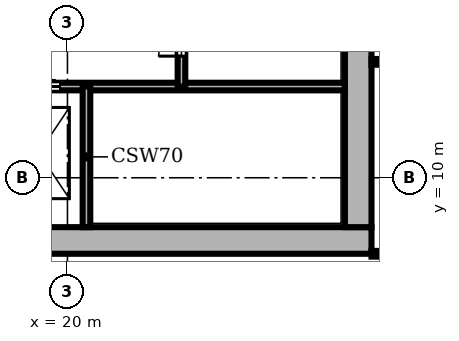
"""IFC4 building model, lengths in metres.
Left out: names, types, materials, properties, quantities, classifications, styles, units other than length and angle.
Written with IfcOpenShell. Run it as: python <this file> out.ifc"""

import sys

from ifc_helpers import new_model, si_unit, direction, frame, frame_2d, origin, place, context, subcontext, project, spatial, rectangle, extrude, element, fill, save


model = new_model("IFC4")
c1 = context("Model", 3, precision=1e-05, world=origin(), true_north=direction((0.0, 1.0)))
c2 = subcontext(c1, "Body", "Model", "MODEL_VIEW")
j1 = project(units=[si_unit("LENGTHUNIT", "METRE"), si_unit("PLANEANGLEUNIT", "RADIAN")], contexts=[c1])
p1 = place(None, origin())
s1 = spatial("IfcSite", under=j1, at=p1, CompositionType="ELEMENT")
p2 = place(p1, origin())
s2 = spatial("IfcBuilding", under=s1, at=p2, CompositionType="ELEMENT")
p3 = place(p2, frame((0.0, 0.0, 205.8)))
s3 = spatial("IfcBuildingStorey", under=s2, at=p3, CompositionType="ELEMENT", Elevation=205.8)
p4 = place(p3, frame((8.0, 8.35, 0.0), z_axis=(0.0, 0.0, 1.0), x_axis=(1.0, 0.0, 0.0)))
e1 = element("IfcWall", 1, at=p4, inside=s3, PredefinedType="SHEAR", context=c2, shape_type="SweptSolid", body=[
    extrude(rectangle(XDim=20.0, YDim=0.7, at=frame_2d((10.0, 0.0))), origin(), (0.0, 0.0, 1.0), 3.9),
])
p5 = place(p3, frame((27.65, 8.7, 0.0), z_axis=(0.0, 0.0, 1.0), x_axis=(0.0, 1.0, 0.0)))
e2 = element("IfcWall", 2, at=p5, inside=s3, PredefinedType="SHEAR", context=c2, shape_type="SweptSolid", body=[
    extrude(rectangle(XDim=18.6, YDim=0.7, at=frame_2d((9.3, 0.0))), origin(), (0.0, 0.0, 1.0), 3.9),
])
p6 = place(p5, frame((4.75, 0.0, 0.0)))
e3 = element("IfcOpeningElement", 3, at=p6, cuts=e2, PredefinedType="OPENING", context=c2, shape_type="SweptSolid", body=[
    extrude(rectangle(XDim=1.6, YDim=2.1, at=frame_2d((0.8, 1.05))), frame((0.0, 0.36, 0.0), z_axis=(0.0, -1.0, 0.0), x_axis=(1.0, 0.0, 0.0)), (0.0, 0.0, 1.0), 0.72),
])
p7 = place(p3, frame((13.8, 12.4, 0.0), z_axis=(0.0, 0.0, 1.0), x_axis=(1.0, 0.0, 0.0)))
e4 = element("IfcWall", 4, at=p7, inside=s3, PredefinedType="SHEAR", context=c2, shape_type="SweptSolid", body=[
    extrude(rectangle(XDim=13.5, YDim=0.2, at=frame_2d((6.75, 0.0))), origin(), (0.0, 0.0, 1.0), 3.58),
])
p8 = place(p7, frame((2.4, 0.0, 0.0)))
e5 = element("IfcOpeningElement", 5, at=p8, cuts=e4, PredefinedType="OPENING", context=c2, shape_type="SweptSolid", body=[
    extrude(rectangle(XDim=1.1, YDim=2.1, at=frame_2d((0.55, 1.05))), frame((0.0, 0.11, 0.0), z_axis=(0.0, -1.0, 0.0), x_axis=(1.0, 0.0, 0.0)), (0.0, 0.0, 1.0), 0.22),
])
p9 = place(p7, frame((4.9, 0.0, 0.0)))
e6 = element("IfcOpeningElement", 6, at=p9, cuts=e4, PredefinedType="OPENING", context=c2, shape_type="SweptSolid", body=[
    extrude(rectangle(XDim=1.1, YDim=2.1, at=frame_2d((0.55, 1.05))), frame((0.0, 0.11, 0.0), z_axis=(0.0, -1.0, 0.0), x_axis=(1.0, 0.0, 0.0)), (0.0, 0.0, 1.0), 0.22),
])
p10 = place(p7, frame((0.2, 0.0, 0.0)))
e7 = element("IfcOpeningElement", 7, at=p10, cuts=e4, PredefinedType="OPENING", context=c2, shape_type="SweptSolid", body=[
    extrude(rectangle(XDim=1.0, YDim=2.1, at=frame_2d((0.5, 1.05))), frame((0.0, 0.11, 0.0), z_axis=(0.0, -1.0, 0.0), x_axis=(1.0, 0.0, 0.0)), (0.0, 0.0, 1.0), 0.22),
])
p11 = place(p3, frame((20.5, 8.7, 0.0), z_axis=(0.0, 0.0, 1.0), x_axis=(0.0, 1.0, 0.0)))
e8 = element("IfcWall", 8, at=p11, inside=s3, PredefinedType="SHEAR", context=c2, shape_type="SweptSolid", body=[
    extrude(rectangle(XDim=3.7, YDim=0.2, at=frame_2d((1.85, 0.0))), origin(), (0.0, 0.0, 1.0), 3.58),
])
p12 = place(p3, frame((23.0, 12.4, 0.0), z_axis=(0.0, 0.0, 1.0), x_axis=(0.0, 1.0, 0.0)))
e9 = element("IfcWall", 9, at=p12, inside=s3, PredefinedType="SHEAR", context=c2, shape_type="SweptSolid", body=[
    extrude(rectangle(XDim=2.8, YDim=0.2, at=frame_2d((1.4, 0.0))), origin(), (0.0, 0.0, 1.0), 3.58),
])
p13 = place(p12, frame((0.8, 0.0, 0.0)))
e10 = element("IfcOpeningElement", 10, at=p13, cuts=e9, PredefinedType="OPENING", context=c2, shape_type="SweptSolid", body=[
    extrude(rectangle(XDim=1.2, YDim=2.1, at=frame_2d((0.6, 1.05))), frame((0.0, 0.11, 0.0), z_axis=(0.0, -1.0, 0.0), x_axis=(1.0, 0.0, 0.0)), (0.0, 0.0, 1.0), 0.22),
])
for number, where, z_axis, x_axis in (
    (11, (28.0, 8.0, 0.0), (0.0, 0.0, 1.0), (1.0, 0.0, 0.0)),
    (12, (28.0, 13.05, 0.0), (0.0, 0.0, 1.0), (1.0, 0.0, 0.0)),
):
    element("IfcWall", number, at=place(p3, frame(where, z_axis=z_axis, x_axis=x_axis)), inside=s3, PredefinedType="PARTITIONING", context=c2, shape_type="SweptSolid", body=[
        extrude(rectangle(XDim=2.8, YDim=0.15, at=frame_2d((1.4, 0.0))), origin(), (0.0, 0.0, 1.0), 3.58),
    ])
p14 = place(p9, origin())
e13 = element("IfcDoor", 13, at=p14, inside=s3, OperationType="DOUBLE_DOOR_SLIDING", PredefinedType="DOOR", context=c2, shape_type="SweptSolid", body=[
    extrude(rectangle(XDim=1.1, YDim=2.1, at=frame_2d((0.55, 1.05))), frame((0.0, 0.025, 0.0), z_axis=(0.0, -1.0, 0.0), x_axis=(1.0, 0.0, 0.0)), (0.0, 0.0, 1.0), 0.05),
])
fill(e6, e13)
p15 = place(p13, origin())
e14 = element("IfcDoor", 14, at=p15, inside=s3, OperationType="DOUBLE_DOOR_SINGLE_SWING", PredefinedType="DOOR", context=c2, shape_type="SweptSolid", body=[
    extrude(rectangle(XDim=1.2, YDim=2.1, at=frame_2d((0.6, 1.05))), frame((0.0, 0.025, 0.0), z_axis=(0.0, -1.0, 0.0), x_axis=(1.0, 0.0, 0.0)), (0.0, 0.0, 1.0), 0.05),
])
fill(e10, e14)
save(model, sys.argv[1])
